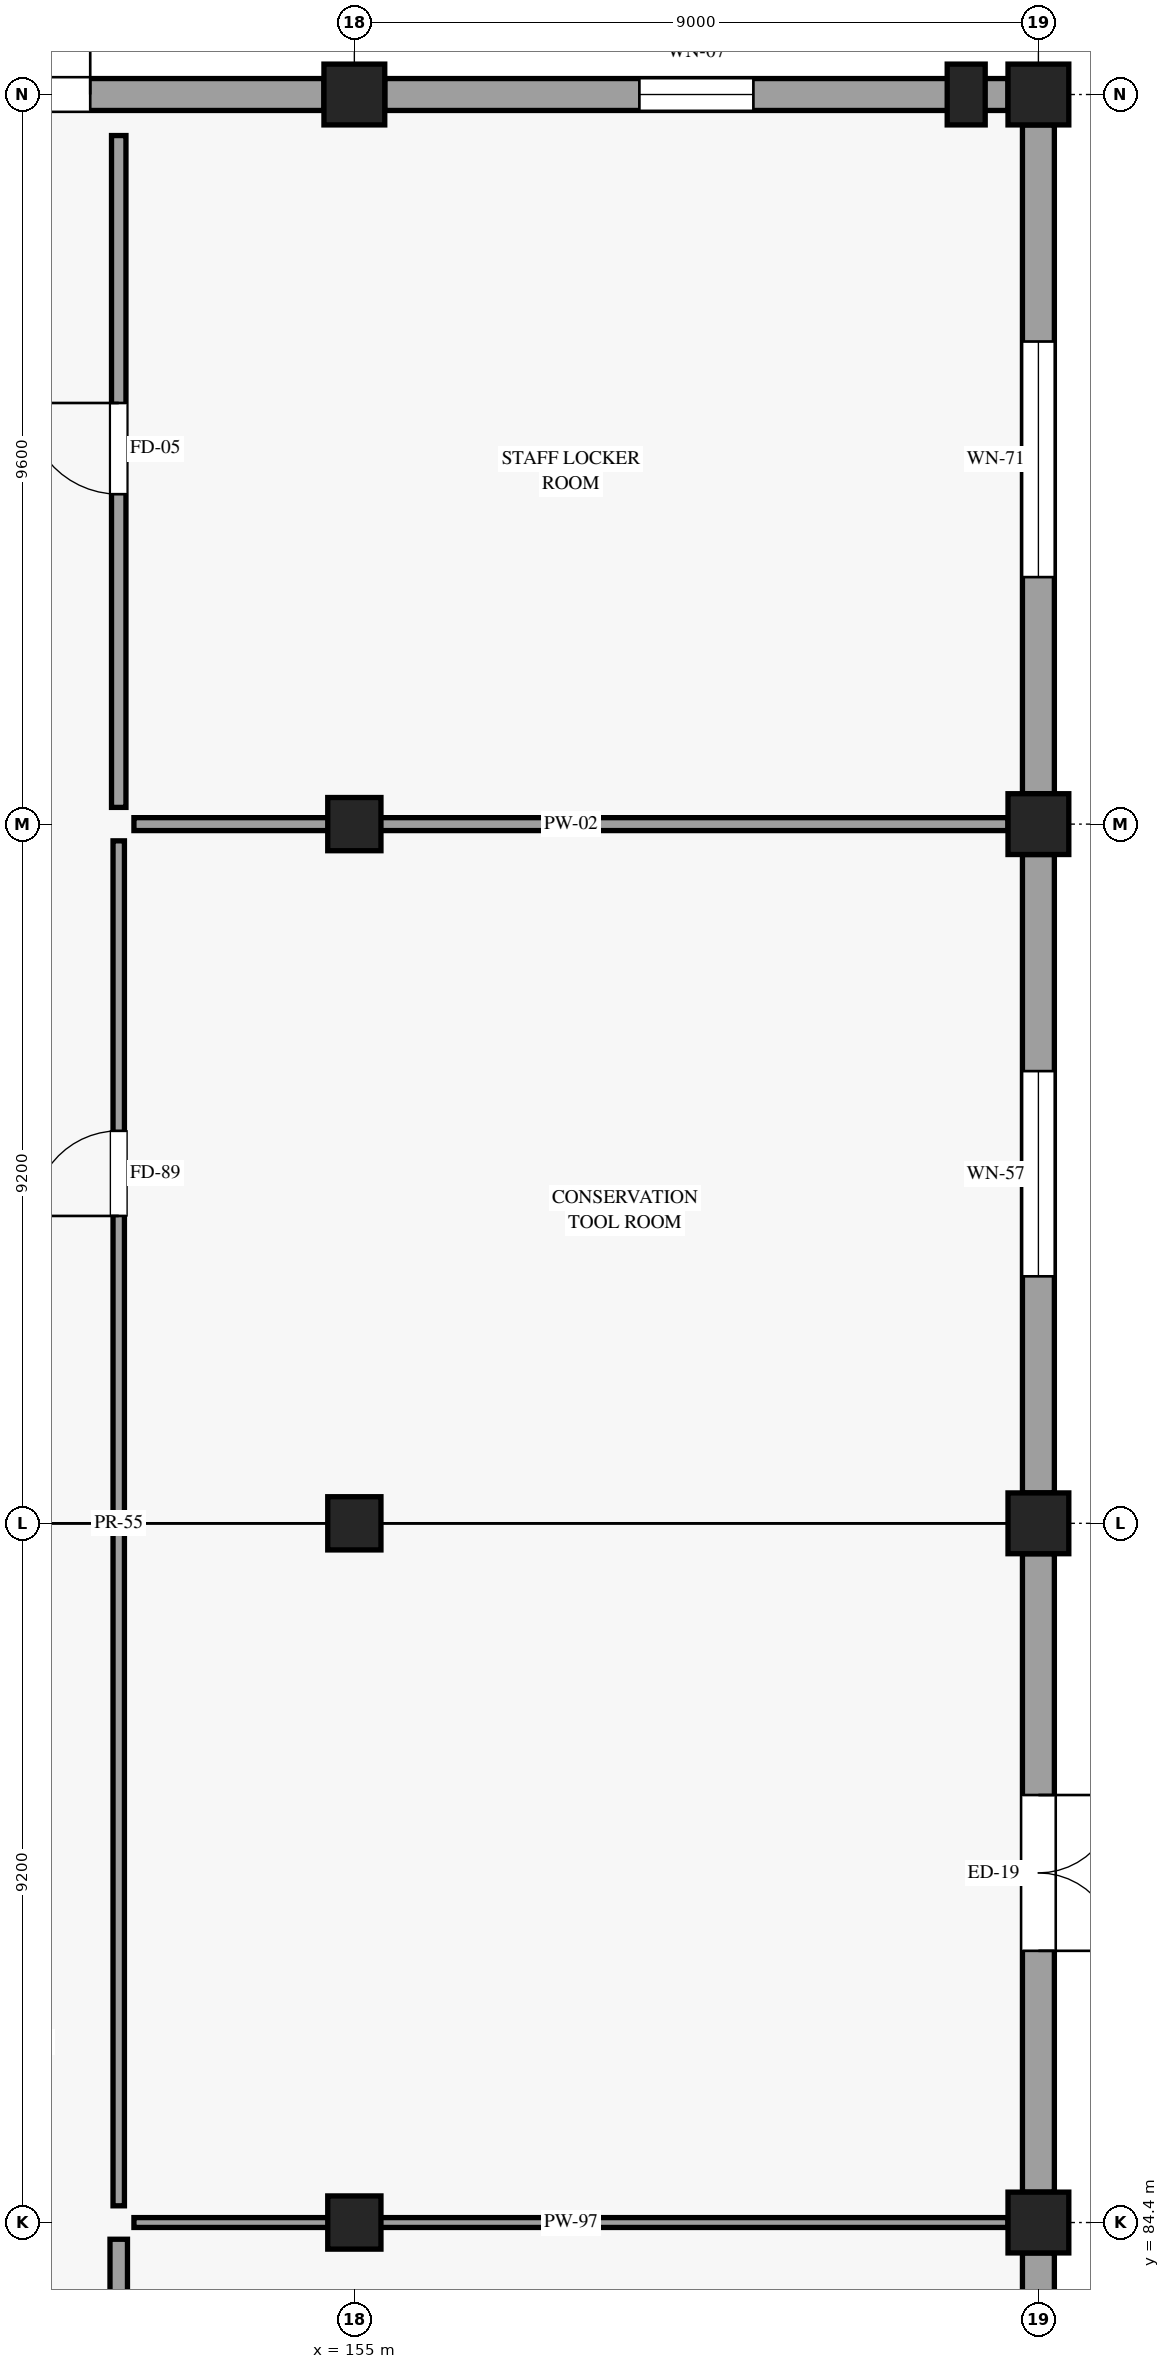
"""IFC4 building model, lengths in metres.
Left out: names, types, materials, properties, quantities, classifications, styles, units other than length and angle.
Written with IfcOpenShell. Run it as: python <this file> out.ifc"""

import sys

from ifc_helpers import new_model, si_unit, direction, frame, frame_2d, origin, origin_2d, place, context, subcontext, project, spatial, rectangle, extrude, element, fill, save


model = new_model("IFC4")
c1 = context("Model", 3, precision=1e-05, world=origin(), true_north=direction((0.0, 1.0)))
c2 = subcontext(c1, "Body", "Model", "MODEL_VIEW")
j1 = project(units=[si_unit("LENGTHUNIT", "METRE"), si_unit("PLANEANGLEUNIT", "RADIAN")], contexts=[c1])
p1 = place(None, origin())
s1 = spatial("IfcSite", under=j1, at=p1, CompositionType="ELEMENT")
p2 = place(p1, origin())
s2 = spatial("IfcBuilding", under=s1, at=p2, CompositionType="ELEMENT")
p3 = place(p2, origin())
s3 = spatial("IfcBuildingStorey", under=s2, at=p3, CompositionType="ELEMENT", Elevation=0.0)
for number, where, z_axis, x_axis in (
    (1, (155.0, 84.4, 0.0), (0.0, 0.0, 1.0), (1.0, 0.0, 0.0)),
    (2, (155.0, 93.6, 0.0), (0.0, 0.0, 1.0), (1.0, 0.0, 0.0)),
    (3, (155.0, 102.8, 0.0), (0.0, 0.0, 1.0), (1.0, 0.0, 0.0)),
):
    element("IfcColumn", number, at=place(p3, frame(where, z_axis=z_axis, x_axis=x_axis)), inside=s3, PredefinedType="COLUMN", context=c2, shape_type="SweptSolid", body=[
        extrude(rectangle(XDim=0.7, YDim=0.7, at=origin_2d()), origin(), (0.0, 0.0, 1.0), 5.4),
    ])
for number, where, z_axis, x_axis in (
    (4, (155.0, 112.4, 0.0), (0.0, 0.0, 1.0), (1.0, 0.0, 0.0)),
    (5, (164.0, 84.4, 0.0), (0.0, 0.0, 1.0), (1.0, 0.0, 0.0)),
    (6, (164.0, 93.6, 0.0), (0.0, 0.0, 1.0), (1.0, 0.0, 0.0)),
    (7, (164.0, 102.8, 0.0), (0.0, 0.0, 1.0), (1.0, 0.0, 0.0)),
    (8, (164.0, 112.4, 0.0), (0.0, 0.0, 1.0), (1.0, 0.0, 0.0)),
):
    element("IfcColumn", number, at=place(p3, frame(where, z_axis=z_axis, x_axis=x_axis)), inside=s3, PredefinedType="COLUMN", context=c2, shape_type="SweptSolid", body=[
        extrude(rectangle(XDim=0.8, YDim=0.8, at=origin_2d()), origin(), (0.0, 0.0, 1.0), 5.4),
    ])
p4 = place(p3, frame((163.05, 112.4, 0.0), z_axis=(0.0, 0.0, 1.0), x_axis=(1.0, 0.0, 0.0)))
e9 = element("IfcColumn", 9, at=p4, inside=s3, PredefinedType="PILASTER", context=c2, shape_type="SweptSolid", body=[
    extrude(rectangle(XDim=0.5, YDim=0.8, at=origin_2d()), origin(), (0.0, 0.0, 1.0), 4.35),
])
p5 = place(p3, frame((146.4, 112.4, 0.0), z_axis=(0.0, 0.0, 1.0), x_axis=(1.0, 0.0, 0.0)))
e10 = element("IfcWall", 10, at=p5, inside=s3, PredefinedType="STANDARD", context=c2, shape_type="SweptSolid", body=[
    extrude(rectangle(XDim=8.2, YDim=0.42, at=frame_2d((4.1, 0.0))), origin(), (0.0, 0.0, 1.0), 4.095),
])
p6 = place(p5, frame((3.075, 0.0, 0.0)))
e11 = element("IfcOpeningElement", 11, at=p6, cuts=e10, PredefinedType="OPENING", context=c2, shape_type="SweptSolid", body=[
    extrude(rectangle(XDim=2.05, YDim=2.45, at=frame_2d((1.025, 1.225))), frame((0.0, 0.22, 0.0), z_axis=(0.0, -1.0, 0.0), x_axis=(1.0, 0.0, 0.0)), (0.0, 0.0, 1.0), 0.44),
])
p7 = place(p3, frame((155.4, 112.4, 0.0), z_axis=(0.0, 0.0, 1.0), x_axis=(1.0, 0.0, 0.0)))
e12 = element("IfcWall", 12, at=p7, inside=s3, PredefinedType="STANDARD", context=c2, shape_type="SweptSolid", body=[
    extrude(rectangle(XDim=8.2, YDim=0.42, at=frame_2d((4.1, 0.0))), origin(), (0.0, 0.0, 1.0), 4.095),
])
p8 = place(p7, frame((3.35, 0.0, 0.85)))
e13 = element("IfcOpeningElement", 13, at=p8, cuts=e12, PredefinedType="OPENING", context=c2, shape_type="SweptSolid", body=[
    extrude(rectangle(XDim=1.5, YDim=2.2, at=frame_2d((0.75, 1.1))), frame((0.0, 0.22, 0.0), z_axis=(0.0, -1.0, 0.0), x_axis=(1.0, 0.0, 0.0)), (0.0, 0.0, 1.0), 0.44),
])
p9 = place(p3, frame((164.0, 75.6, 0.0), z_axis=(0.0, 0.0, 1.0), x_axis=(0.0, 1.0, 0.0)))
e14 = element("IfcWall", 14, at=p9, inside=s3, PredefinedType="STANDARD", context=c2, shape_type="SweptSolid", body=[
    extrude(rectangle(XDim=8.4, YDim=0.42, at=frame_2d((4.2, 0.0))), origin(), (0.0, 0.0, 1.0), 4.095),
])
p10 = place(p9, frame((5.25, 0.0, 0.85), z_axis=(0.0, 0.0, 1.0), x_axis=(-1.0, 0.0, 0.0)))
e15 = element("IfcOpeningElement", 15, at=p10, cuts=e14, PredefinedType="OPENING", context=c2, shape_type="SweptSolid", body=[
    extrude(rectangle(XDim=2.1, YDim=2.45, at=frame_2d((1.05, 1.225))), frame((0.0, 0.22, 0.0), z_axis=(0.0, -1.0, 0.0), x_axis=(1.0, 0.0, 0.0)), (0.0, 0.0, 1.0), 0.44),
])
p11 = place(p3, frame((164.0, 84.8, 0.0), z_axis=(0.0, 0.0, 1.0), x_axis=(0.0, 1.0, 0.0)))
e16 = element("IfcWall", 16, at=p11, inside=s3, PredefinedType="STANDARD", context=c2, shape_type="SweptSolid", body=[
    extrude(rectangle(XDim=8.4, YDim=0.42, at=frame_2d((4.2, 0.0))), origin(), (0.0, 0.0, 1.0), 4.095),
])
p12 = place(p11, frame((5.225, 0.0, 0.0), z_axis=(0.0, 0.0, 1.0), x_axis=(-1.0, 0.0, 0.0)))
e17 = element("IfcOpeningElement", 17, at=p12, cuts=e16, PredefinedType="OPENING", context=c2, shape_type="SweptSolid", body=[
    extrude(rectangle(XDim=2.05, YDim=2.45, at=frame_2d((1.025, 1.225))), frame((0.0, 0.22, 0.0), z_axis=(0.0, -1.0, 0.0), x_axis=(1.0, 0.0, 0.0)), (0.0, 0.0, 1.0), 0.44),
])
p13 = place(p3, frame((164.0, 94.0, 0.0), z_axis=(0.0, 0.0, 1.0), x_axis=(0.0, 1.0, 0.0)))
e18 = element("IfcWall", 18, at=p13, inside=s3, PredefinedType="STANDARD", context=c2, shape_type="SweptSolid", body=[
    extrude(rectangle(XDim=8.4, YDim=0.42, at=frame_2d((4.2, 0.0))), origin(), (0.0, 0.0, 1.0), 4.095),
])
p14 = place(p13, frame((5.55, 0.0, 0.85), z_axis=(0.0, 0.0, 1.0), x_axis=(-1.0, 0.0, 0.0)))
e19 = element("IfcOpeningElement", 19, at=p14, cuts=e18, PredefinedType="OPENING", context=c2, shape_type="SweptSolid", body=[
    extrude(rectangle(XDim=2.7, YDim=2.2, at=frame_2d((1.35, 1.1))), frame((0.0, 0.22, 0.0), z_axis=(0.0, -1.0, 0.0), x_axis=(1.0, 0.0, 0.0)), (0.0, 0.0, 1.0), 0.44),
])
p15 = place(p3, frame((164.0, 103.2, 0.0), z_axis=(0.0, 0.0, 1.0), x_axis=(0.0, 1.0, 0.0)))
e20 = element("IfcWall", 20, at=p15, inside=s3, PredefinedType="STANDARD", context=c2, shape_type="SweptSolid", body=[
    extrude(rectangle(XDim=8.8, YDim=0.42, at=frame_2d((4.4, 0.0))), origin(), (0.0, 0.0, 1.0), 4.095),
])
p16 = place(p15, frame((5.95, 0.0, 0.85), z_axis=(0.0, 0.0, 1.0), x_axis=(-1.0, 0.0, 0.0)))
e21 = element("IfcOpeningElement", 21, at=p16, cuts=e20, PredefinedType="OPENING", context=c2, shape_type="SweptSolid", body=[
    extrude(rectangle(XDim=3.1, YDim=2.3, at=frame_2d((1.55, 1.15))), frame((0.0, 0.22, 0.0), z_axis=(0.0, -1.0, 0.0), x_axis=(1.0, 0.0, 0.0)), (0.0, 0.0, 1.0), 0.44),
])
p17 = place(p3, frame((151.9, 75.42, 0.0), z_axis=(0.0, 0.0, 1.0), x_axis=(0.0, 1.0, 0.0)))
e22 = element("IfcWall", 22, at=p17, inside=s3, PredefinedType="PARTITIONING", context=c2, shape_type="SweptSolid", body=[
    extrude(rectangle(XDim=8.76, YDim=0.23, at=frame_2d((4.38, 0.0))), origin(), (0.0, 0.0, 1.0), 4.095),
])
p18 = place(p17, frame((3.88, 0.0, 0.0)))
e23 = element("IfcOpeningElement", 23, at=p18, cuts=e22, PredefinedType="OPENING", context=c2, shape_type="SweptSolid", body=[
    extrude(rectangle(XDim=1.04, YDim=2.22, at=frame_2d((0.52, 1.11))), frame((0.0, 0.125, 0.0), z_axis=(0.0, -1.0, 0.0), x_axis=(1.0, 0.0, 0.0)), (0.0, 0.0, 1.0), 0.25),
])
p19 = place(p3, frame((152.1, 84.4, 0.0), z_axis=(0.0, 0.0, 1.0), x_axis=(1.0, 0.0, 0.0)))
e24 = element("IfcWall", 24, at=p19, inside=s3, PredefinedType="PARTITIONING", context=c2, shape_type="SweptSolid", body=[
    extrude(rectangle(XDim=11.5, YDim=0.13, at=frame_2d((5.75, 0.0))), origin(), (0.0, 0.0, 1.0), 4.095),
])
p20 = place(p3, frame((151.9, 84.62, 0.0), z_axis=(0.0, 0.0, 1.0), x_axis=(0.0, 1.0, 0.0)))
e25 = element("IfcWall", 25, at=p20, inside=s3, PredefinedType="PARTITIONING", context=c2, shape_type="SweptSolid", body=[
    extrude(rectangle(XDim=17.96, YDim=0.15, at=frame_2d((8.98, 0.0))), origin(), (0.0, 0.0, 1.0), 4.095),
])
p21 = place(p20, frame((13.024, 0.0, 0.0)))
e26 = element("IfcOpeningElement", 26, at=p21, cuts=e25, PredefinedType="OPENING", context=c2, shape_type="SweptSolid", body=[
    extrude(rectangle(XDim=1.12, YDim=2.26, at=frame_2d((0.56, 1.13))), frame((0.0, 0.085, 0.0), z_axis=(0.0, -1.0, 0.0), x_axis=(1.0, 0.0, 0.0)), (0.0, 0.0, 1.0), 0.17),
])
p22 = place(p3, frame((152.1, 102.8, 0.0), z_axis=(0.0, 0.0, 1.0), x_axis=(1.0, 0.0, 0.0)))
e27 = element("IfcWall", 27, at=p22, inside=s3, PredefinedType="PARTITIONING", context=c2, shape_type="SweptSolid", body=[
    extrude(rectangle(XDim=11.5, YDim=0.17, at=frame_2d((5.75, 0.0))), origin(), (0.0, 0.0, 1.0), 4.095),
])
p23 = place(p3, frame((151.9, 103.02, 0.0), z_axis=(0.0, 0.0, 1.0), x_axis=(0.0, 1.0, 0.0)))
e28 = element("IfcWall", 28, at=p23, inside=s3, PredefinedType="PARTITIONING", context=c2, shape_type="SweptSolid", body=[
    extrude(rectangle(XDim=8.84, YDim=0.19, at=frame_2d((4.42, 0.0))), origin(), (0.0, 0.0, 1.0), 4.095),
])
p24 = place(p23, frame((4.121, 0.0, 0.0)))
e29 = element("IfcOpeningElement", 29, at=p24, cuts=e28, PredefinedType="OPENING", context=c2, shape_type="SweptSolid", body=[
    extrude(rectangle(XDim=1.2, YDim=2.3, at=frame_2d((0.6, 1.15))), frame((0.0, 0.105, 0.0), z_axis=(0.0, -1.0, 0.0), x_axis=(1.0, 0.0, 0.0)), (0.0, 0.0, 1.0), 0.21),
])
p25 = place(p6, origin())
e30 = element("IfcDoor", 30, at=p25, inside=s3, OperationType="DOUBLE_DOOR_SINGLE_SWING", PredefinedType="DOOR", context=c2, shape_type="SweptSolid", body=[
    extrude(rectangle(XDim=2.05, YDim=2.45, at=frame_2d((1.025, 1.225))), frame((0.0, 0.025, 0.0), z_axis=(0.0, -1.0, 0.0), x_axis=(1.0, 0.0, 0.0)), (0.0, 0.0, 1.0), 0.05),
])
fill(e11, e30)
p26 = place(p8, origin())
e31 = element("IfcWindow", 31, at=p26, inside=s3, PartitioningType="SINGLE_PANEL", PredefinedType="WINDOW", context=c2, shape_type="SweptSolid", body=[
    extrude(rectangle(XDim=1.5, YDim=2.2, at=frame_2d((0.75, 1.1))), frame((0.0, 0.03, 0.0), z_axis=(0.0, -1.0, 0.0), x_axis=(1.0, 0.0, 0.0)), (0.0, 0.0, 1.0), 0.06),
])
fill(e13, e31)
p27 = place(p12, origin())
e32 = element("IfcDoor", 32, at=p27, inside=s3, OperationType="DOUBLE_DOOR_SINGLE_SWING", PredefinedType="DOOR", context=c2, shape_type="SweptSolid", body=[
    extrude(rectangle(XDim=2.05, YDim=2.45, at=frame_2d((1.025, 1.225))), frame((0.0, 0.025, 0.0), z_axis=(0.0, -1.0, 0.0), x_axis=(1.0, 0.0, 0.0)), (0.0, 0.0, 1.0), 0.05),
])
fill(e17, e32)
p28 = place(p14, origin())
e33 = element("IfcWindow", 33, at=p28, inside=s3, PartitioningType="SINGLE_PANEL", PredefinedType="WINDOW", context=c2, shape_type="SweptSolid", body=[
    extrude(rectangle(XDim=2.7, YDim=2.2, at=frame_2d((1.35, 1.1))), frame((0.0, 0.03, 0.0), z_axis=(0.0, -1.0, 0.0), x_axis=(1.0, 0.0, 0.0)), (0.0, 0.0, 1.0), 0.06),
])
fill(e19, e33)
p29 = place(p16, origin())
e34 = element("IfcWindow", 34, at=p29, inside=s3, PartitioningType="SINGLE_PANEL", PredefinedType="WINDOW", context=c2, shape_type="SweptSolid", body=[
    extrude(rectangle(XDim=3.1, YDim=2.3, at=frame_2d((1.55, 1.15))), frame((0.0, 0.03, 0.0), z_axis=(0.0, -1.0, 0.0), x_axis=(1.0, 0.0, 0.0)), (0.0, 0.0, 1.0), 0.06),
])
fill(e21, e34)
p30 = place(p21, origin())
e35 = element("IfcDoor", 35, at=p30, inside=s3, OperationType="SINGLE_SWING_LEFT", PredefinedType="DOOR", context=c2, shape_type="SweptSolid", body=[
    extrude(rectangle(XDim=1.12, YDim=2.26, at=frame_2d((0.56, 1.13))), frame((0.0, 0.025, 0.0), z_axis=(0.0, -1.0, 0.0), x_axis=(1.0, 0.0, 0.0)), (0.0, 0.0, 1.0), 0.05),
])
fill(e26, e35)
p31 = place(p24, origin())
e36 = element("IfcDoor", 36, at=p31, inside=s3, OperationType="SINGLE_SWING_RIGHT", PredefinedType="DOOR", context=c2, shape_type="SweptSolid", body=[
    extrude(rectangle(XDim=1.2, YDim=2.3, at=frame_2d((0.6, 1.15))), frame((0.0, 0.025, 0.0), z_axis=(0.0, -1.0, 0.0), x_axis=(1.0, 0.0, 0.0)), (0.0, 0.0, 1.0), 0.05),
])
fill(e29, e36)
save(model, sys.argv[1])
